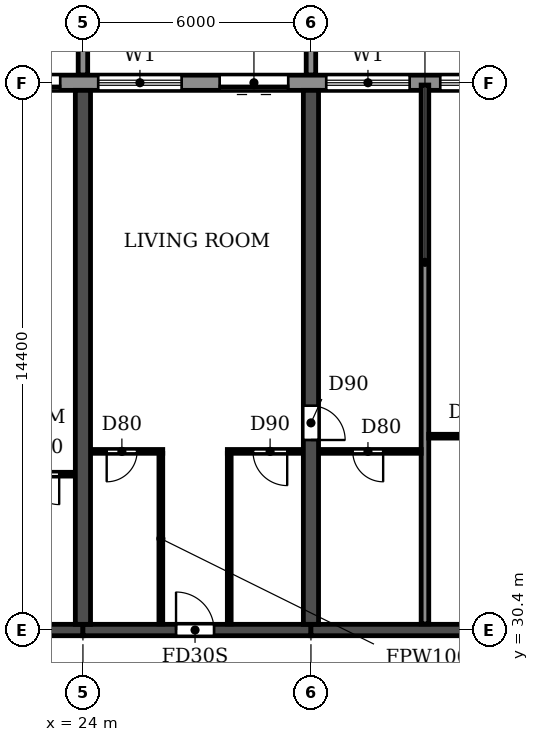
"""IFC4 building model, lengths in metres.
Left out: names, types, materials, properties, quantities, classifications, styles, units other than length and angle.
Written with IfcOpenShell. Run it as: python <this file> out.ifc"""

import sys

from ifc_helpers import new_model, si_unit, direction, frame, frame_2d, origin, place, context, subcontext, project, spatial, polyline, rectangle, outline, extrude, source, transform, mapped, element, fill, save


model = new_model("IFC4")
c1 = context("Model", 3, precision=1e-05, world=origin(), true_north=direction((0.0, 1.0)))
c2 = subcontext(c1, "Body", "Model", "MODEL_VIEW")
j1 = project(units=[si_unit("LENGTHUNIT", "METRE"), si_unit("PLANEANGLEUNIT", "RADIAN")], contexts=[c1])
p1 = place(None, origin())
s1 = spatial("IfcSite", under=j1, at=p1, CompositionType="ELEMENT")
p2 = place(p1, origin())
s2 = spatial("IfcBuilding", under=s1, at=p2, CompositionType="ELEMENT")
p3 = place(p2, frame((0.0, 0.0, 56.4)))
s3 = spatial("IfcBuildingStorey", under=s2, at=p3, CompositionType="ELEMENT", Elevation=56.4)
p4 = place(p3, frame((24.0, 30.55, 0.0), z_axis=(0.0, 0.0, 1.0), x_axis=(0.0, 1.0, 0.0)))
e1 = element("IfcWall", 1, at=p4, inside=s3, PredefinedType="SHEAR", context=c2, shape_type="SweptSolid", body=[
    extrude(rectangle(XDim=14.05, YDim=0.4, at=frame_2d((7.025, 0.0))), origin(), (0.0, 0.0, 1.0), 3.05),
])
p5 = place(p3, frame((30.0, 30.55, 0.0), z_axis=(0.0, 0.0, 1.0), x_axis=(0.0, 1.0, 0.0)))
e2 = element("IfcWall", 2, at=p5, inside=s3, PredefinedType="SHEAR", context=c2, shape_type="SweptSolid", body=[
    extrude(rectangle(XDim=14.05, YDim=0.4, at=frame_2d((7.025, 0.0))), origin(), (0.0, 0.0, 1.0), 3.05),
])
p6 = place(p5, frame((4.85, 0.0, 0.0)))
e3 = element("IfcOpeningElement", 3, at=p6, cuts=e2, PredefinedType="OPENING", context=c2, shape_type="SweptSolid", body=[
    extrude(rectangle(XDim=0.9, YDim=2.1, at=frame_2d((0.45, 1.05))), frame((0.0, 0.21, 0.0), z_axis=(0.0, -1.0, 0.0), x_axis=(1.0, 0.0, 0.0)), (0.0, 0.0, 1.0), 0.42),
])
p7 = place(p3, frame((18.0, 30.4, 0.0), z_axis=(0.0, 0.0, 1.0), x_axis=(1.0, 0.0, 0.0)))
e4 = element("IfcWall", 4, at=p7, inside=s3, PredefinedType="SHEAR", context=c2, shape_type="SweptSolid", body=[
    extrude(rectangle(XDim=6.0, YDim=0.3, at=frame_2d((3.0, 0.0))), origin(), (0.0, 0.0, 1.0), 2.45),
])
p8 = place(p7, frame((2.55, 0.0, 0.0)))
e5 = element("IfcOpeningElement", 5, at=p8, cuts=e4, PredefinedType="OPENING", context=c2, shape_type="SweptSolid", body=[
    extrude(rectangle(XDim=1.0, YDim=2.1, at=frame_2d((0.5, 1.05))), frame((0.0, 0.16, 0.0), z_axis=(0.0, -1.0, 0.0), x_axis=(1.0, 0.0, 0.0)), (0.0, 0.0, 1.0), 0.32),
])
p9 = place(p3, frame((24.0, 30.4, 0.0), z_axis=(0.0, 0.0, 1.0), x_axis=(1.0, 0.0, 0.0)))
e6 = element("IfcWall", 6, at=p9, inside=s3, PredefinedType="SHEAR", context=c2, shape_type="SweptSolid", body=[
    extrude(rectangle(XDim=6.0, YDim=0.3, at=frame_2d((3.0, 0.0))), origin(), (0.0, 0.0, 1.0), 2.45),
])
p10 = place(p9, frame((2.45, 0.0, 0.0)))
e7 = element("IfcOpeningElement", 7, at=p10, cuts=e6, PredefinedType="OPENING", context=c2, shape_type="SweptSolid", body=[
    extrude(rectangle(XDim=1.0, YDim=2.1, at=frame_2d((0.5, 1.05))), frame((0.0, 0.16, 0.0), z_axis=(0.0, -1.0, 0.0), x_axis=(1.0, 0.0, 0.0)), (0.0, 0.0, 1.0), 0.32),
])
p11 = place(p3, frame((30.0, 30.4, 0.0), z_axis=(0.0, 0.0, 1.0), x_axis=(1.0, 0.0, 0.0)))
e8 = element("IfcWall", 8, at=p11, inside=s3, PredefinedType="SHEAR", context=c2, shape_type="SweptSolid", body=[
    extrude(rectangle(XDim=6.0, YDim=0.3, at=frame_2d((3.0, 0.0))), origin(), (0.0, 0.0, 1.0), 2.45),
])
p12 = place(p3, frame((91.317, 44.8, 0.0), z_axis=(0.0, 0.0, 1.0), x_axis=(-1.0, 0.0, 0.0)))
e9 = element("IfcWall", 9, at=p12, inside=s3, PredefinedType="STANDARD", context=c2, shape_type="SweptSolid", body=[
    extrude(rectangle(XDim=80.634, YDim=0.4, at=frame_2d((40.317, 0.0))), origin(), (0.0, 0.0, 1.0), 3.05),
])
p13 = place(p12, frame((76.717, 0.0, 0.9)))
e10 = element("IfcOpeningElement", 10, at=p13, cuts=e9, PredefinedType="OPENING", context=c2, shape_type="SweptSolid", body=[
    extrude(rectangle(XDim=2.2, YDim=1.5, at=frame_2d((1.1, 0.75))), frame((0.0, 0.21, 0.0), z_axis=(0.0, -1.0, 0.0), x_axis=(1.0, 0.0, 0.0)), (0.0, 0.0, 1.0), 0.42),
])
p14 = place(p12, frame((73.917, 0.0, 0.0)))
e11 = element("IfcOpeningElement", 11, at=p14, cuts=e9, PredefinedType="OPENING", context=c2, shape_type="SweptSolid", body=[
    extrude(rectangle(XDim=1.8, YDim=2.4, at=frame_2d((0.9, 1.2))), frame((0.0, 0.21, 0.0), z_axis=(0.0, -1.0, 0.0), x_axis=(1.0, 0.0, 0.0)), (0.0, 0.0, 1.0), 0.42),
])
p15 = place(p12, frame((70.717, 0.0, 0.9)))
e12 = element("IfcOpeningElement", 12, at=p15, cuts=e9, PredefinedType="OPENING", context=c2, shape_type="SweptSolid", body=[
    extrude(rectangle(XDim=2.2, YDim=1.5, at=frame_2d((1.1, 0.75))), frame((0.0, 0.21, 0.0), z_axis=(0.0, -1.0, 0.0), x_axis=(1.0, 0.0, 0.0)), (0.0, 0.0, 1.0), 0.42),
])
p16 = place(p12, frame((67.917, 0.0, 0.0)))
e13 = element("IfcOpeningElement", 13, at=p16, cuts=e9, PredefinedType="OPENING", context=c2, shape_type="SweptSolid", body=[
    extrude(rectangle(XDim=1.8, YDim=2.4, at=frame_2d((0.9, 1.2))), frame((0.0, 0.21, 0.0), z_axis=(0.0, -1.0, 0.0), x_axis=(1.0, 0.0, 0.0)), (0.0, 0.0, 1.0), 0.42),
])
p17 = place(p12, frame((64.717, 0.0, 0.9)))
e14 = element("IfcOpeningElement", 14, at=p17, cuts=e9, PredefinedType="OPENING", context=c2, shape_type="SweptSolid", body=[
    extrude(rectangle(XDim=2.2, YDim=1.5, at=frame_2d((1.1, 0.75))), frame((0.0, 0.21, 0.0), z_axis=(0.0, -1.0, 0.0), x_axis=(1.0, 0.0, 0.0)), (0.0, 0.0, 1.0), 0.42),
])
p18 = place(p12, frame((61.917, 0.0, 0.0)))
e15 = element("IfcOpeningElement", 15, at=p18, cuts=e9, PredefinedType="OPENING", context=c2, shape_type="SweptSolid", body=[
    extrude(rectangle(XDim=1.8, YDim=2.4, at=frame_2d((0.9, 1.2))), frame((0.0, 0.21, 0.0), z_axis=(0.0, -1.0, 0.0), x_axis=(1.0, 0.0, 0.0)), (0.0, 0.0, 1.0), 0.42),
])
p19 = place(p12, frame((58.717, 0.0, 0.9)))
e16 = element("IfcOpeningElement", 16, at=p19, cuts=e9, PredefinedType="OPENING", context=c2, shape_type="SweptSolid", body=[
    extrude(rectangle(XDim=2.2, YDim=1.5, at=frame_2d((1.1, 0.75))), frame((0.0, 0.21, 0.0), z_axis=(0.0, -1.0, 0.0), x_axis=(1.0, 0.0, 0.0)), (0.0, 0.0, 1.0), 0.42),
])
p20 = place(p12, frame((55.717, 0.0, 0.9)))
e17 = element("IfcOpeningElement", 17, at=p20, cuts=e9, PredefinedType="OPENING", context=c2, shape_type="SweptSolid", body=[
    extrude(rectangle(XDim=2.2, YDim=1.5, at=frame_2d((1.1, 0.75))), frame((0.0, 0.21, 0.0), z_axis=(0.0, -1.0, 0.0), x_axis=(1.0, 0.0, 0.0)), (0.0, 0.0, 1.0), 0.42),
])
p21 = place(p12, frame((52.917, 0.0, 0.0)))
e18 = element("IfcOpeningElement", 18, at=p21, cuts=e9, PredefinedType="OPENING", context=c2, shape_type="SweptSolid", body=[
    extrude(rectangle(XDim=1.8, YDim=2.4, at=frame_2d((0.9, 1.2))), frame((0.0, 0.21, 0.0), z_axis=(0.0, -1.0, 0.0), x_axis=(1.0, 0.0, 0.0)), (0.0, 0.0, 1.0), 0.42),
])
p22 = place(p12, frame((49.717, 0.0, 0.9)))
e19 = element("IfcOpeningElement", 19, at=p22, cuts=e9, PredefinedType="OPENING", context=c2, shape_type="SweptSolid", body=[
    extrude(rectangle(XDim=2.2, YDim=1.5, at=frame_2d((1.1, 0.75))), frame((0.0, 0.21, 0.0), z_axis=(0.0, -1.0, 0.0), x_axis=(1.0, 0.0, 0.0)), (0.0, 0.0, 1.0), 0.42),
])
p23 = place(p12, frame((46.917, 0.0, 0.0)))
e20 = element("IfcOpeningElement", 20, at=p23, cuts=e9, PredefinedType="OPENING", context=c2, shape_type="SweptSolid", body=[
    extrude(rectangle(XDim=1.8, YDim=2.4, at=frame_2d((0.9, 1.2))), frame((0.0, 0.21, 0.0), z_axis=(0.0, -1.0, 0.0), x_axis=(1.0, 0.0, 0.0)), (0.0, 0.0, 1.0), 0.42),
])
p24 = place(p12, frame((43.717, 0.0, 0.9)))
e21 = element("IfcOpeningElement", 21, at=p24, cuts=e9, PredefinedType="OPENING", context=c2, shape_type="SweptSolid", body=[
    extrude(rectangle(XDim=2.2, YDim=1.5, at=frame_2d((1.1, 0.75))), frame((0.0, 0.21, 0.0), z_axis=(0.0, -1.0, 0.0), x_axis=(1.0, 0.0, 0.0)), (0.0, 0.0, 1.0), 0.42),
])
p25 = place(p12, frame((40.717, 0.0, 0.9)))
e22 = element("IfcOpeningElement", 22, at=p25, cuts=e9, PredefinedType="OPENING", context=c2, shape_type="SweptSolid", body=[
    extrude(rectangle(XDim=2.2, YDim=1.5, at=frame_2d((1.1, 0.75))), frame((0.0, 0.21, 0.0), z_axis=(0.0, -1.0, 0.0), x_axis=(1.0, 0.0, 0.0)), (0.0, 0.0, 1.0), 0.42),
])
p26 = place(p12, frame((37.717, 0.0, 0.9)))
e23 = element("IfcOpeningElement", 23, at=p26, cuts=e9, PredefinedType="OPENING", context=c2, shape_type="SweptSolid", body=[
    extrude(rectangle(XDim=2.2, YDim=1.5, at=frame_2d((1.1, 0.75))), frame((0.0, 0.21, 0.0), z_axis=(0.0, -1.0, 0.0), x_axis=(1.0, 0.0, 0.0)), (0.0, 0.0, 1.0), 0.42),
])
p27 = place(p12, frame((34.717, 0.0, 0.9)))
e24 = element("IfcOpeningElement", 24, at=p27, cuts=e9, PredefinedType="OPENING", context=c2, shape_type="SweptSolid", body=[
    extrude(rectangle(XDim=2.2, YDim=1.5, at=frame_2d((1.1, 0.75))), frame((0.0, 0.21, 0.0), z_axis=(0.0, -1.0, 0.0), x_axis=(1.0, 0.0, 0.0)), (0.0, 0.0, 1.0), 0.42),
])
p28 = place(p12, frame((31.917, 0.0, 0.0)))
e25 = element("IfcOpeningElement", 25, at=p28, cuts=e9, PredefinedType="OPENING", context=c2, shape_type="SweptSolid", body=[
    extrude(rectangle(XDim=1.8, YDim=2.4, at=frame_2d((0.9, 1.2))), frame((0.0, 0.21, 0.0), z_axis=(0.0, -1.0, 0.0), x_axis=(1.0, 0.0, 0.0)), (0.0, 0.0, 1.0), 0.42),
])
p29 = place(p12, frame((28.917, 0.0, 0.0)))
e26 = element("IfcOpeningElement", 26, at=p29, cuts=e9, PredefinedType="OPENING", context=c2, shape_type="SweptSolid", body=[
    extrude(rectangle(XDim=1.8, YDim=2.4, at=frame_2d((0.9, 1.2))), frame((0.0, 0.21, 0.0), z_axis=(0.0, -1.0, 0.0), x_axis=(1.0, 0.0, 0.0)), (0.0, 0.0, 1.0), 0.42),
])
p30 = place(p12, frame((25.717, 0.0, 0.9)))
e27 = element("IfcOpeningElement", 27, at=p30, cuts=e9, PredefinedType="OPENING", context=c2, shape_type="SweptSolid", body=[
    extrude(rectangle(XDim=2.2, YDim=1.5, at=frame_2d((1.1, 0.75))), frame((0.0, 0.21, 0.0), z_axis=(0.0, -1.0, 0.0), x_axis=(1.0, 0.0, 0.0)), (0.0, 0.0, 1.0), 0.42),
])
p31 = place(p12, frame((22.917, 0.0, 0.0)))
e28 = element("IfcOpeningElement", 28, at=p31, cuts=e9, PredefinedType="OPENING", context=c2, shape_type="SweptSolid", body=[
    extrude(rectangle(XDim=1.8, YDim=2.4, at=frame_2d((0.9, 1.2))), frame((0.0, 0.21, 0.0), z_axis=(0.0, -1.0, 0.0), x_axis=(1.0, 0.0, 0.0)), (0.0, 0.0, 1.0), 0.42),
])
p32 = place(p12, frame((19.717, 0.0, 0.9)))
e29 = element("IfcOpeningElement", 29, at=p32, cuts=e9, PredefinedType="OPENING", context=c2, shape_type="SweptSolid", body=[
    extrude(rectangle(XDim=2.2, YDim=1.5, at=frame_2d((1.1, 0.75))), frame((0.0, 0.21, 0.0), z_axis=(0.0, -1.0, 0.0), x_axis=(1.0, 0.0, 0.0)), (0.0, 0.0, 1.0), 0.42),
])
p33 = place(p12, frame((16.917, 0.0, 0.0)))
e30 = element("IfcOpeningElement", 30, at=p33, cuts=e9, PredefinedType="OPENING", context=c2, shape_type="SweptSolid", body=[
    extrude(rectangle(XDim=1.8, YDim=2.4, at=frame_2d((0.9, 1.2))), frame((0.0, 0.21, 0.0), z_axis=(0.0, -1.0, 0.0), x_axis=(1.0, 0.0, 0.0)), (0.0, 0.0, 1.0), 0.42),
])
p34 = place(p12, frame((13.717, 0.0, 0.9)))
e31 = element("IfcOpeningElement", 31, at=p34, cuts=e9, PredefinedType="OPENING", context=c2, shape_type="SweptSolid", body=[
    extrude(rectangle(XDim=2.2, YDim=1.5, at=frame_2d((1.1, 0.75))), frame((0.0, 0.21, 0.0), z_axis=(0.0, -1.0, 0.0), x_axis=(1.0, 0.0, 0.0)), (0.0, 0.0, 1.0), 0.42),
])
p35 = place(p12, frame((10.917, 0.0, 0.0)))
e32 = element("IfcOpeningElement", 32, at=p35, cuts=e9, PredefinedType="OPENING", context=c2, shape_type="SweptSolid", body=[
    extrude(rectangle(XDim=1.8, YDim=2.4, at=frame_2d((0.9, 1.2))), frame((0.0, 0.21, 0.0), z_axis=(0.0, -1.0, 0.0), x_axis=(1.0, 0.0, 0.0)), (0.0, 0.0, 1.0), 0.42),
])
p36 = place(p12, frame((7.717, 0.0, 0.9)))
e33 = element("IfcOpeningElement", 33, at=p36, cuts=e9, PredefinedType="OPENING", context=c2, shape_type="SweptSolid", body=[
    extrude(rectangle(XDim=2.2, YDim=1.5, at=frame_2d((1.1, 0.75))), frame((0.0, 0.21, 0.0), z_axis=(0.0, -1.0, 0.0), x_axis=(1.0, 0.0, 0.0)), (0.0, 0.0, 1.0), 0.42),
])
p37 = place(p12, frame((4.717, 0.0, 0.9)))
e34 = element("IfcOpeningElement", 34, at=p37, cuts=e9, PredefinedType="OPENING", context=c2, shape_type="SweptSolid", body=[
    extrude(rectangle(XDim=2.2, YDim=1.5, at=frame_2d((1.1, 0.75))), frame((0.0, 0.21, 0.0), z_axis=(0.0, -1.0, 0.0), x_axis=(1.0, 0.0, 0.0)), (0.0, 0.0, 1.0), 0.42),
])
p38 = place(p12, frame((1.717, 0.0, 0.9)))
e35 = element("IfcOpeningElement", 35, at=p38, cuts=e9, PredefinedType="OPENING", context=c2, shape_type="SweptSolid", body=[
    extrude(rectangle(XDim=2.2, YDim=1.5, at=frame_2d((1.1, 0.75))), frame((0.0, 0.21, 0.0), z_axis=(0.0, -1.0, 0.0), x_axis=(1.0, 0.0, 0.0)), (0.0, 0.0, 1.0), 0.42),
])
m1 = source(origin(), c2, "Body", "SweptSolid", [
    extrude(outline(polyline([(0.0, 0.0), (0.25, 0.0), (0.25, 3.1), (0.0, 3.1), (0.0, 0.0)])), origin(), (0.0, 0.0, 1.0), 3.1),
])
for number, where in (
    (36, (23.875, 45.0, 0.0)),
    (37, (29.875, 45.0, 0.0)),
):
    element("IfcWall", number, at=place(p3, frame(where)), inside=s3, PredefinedType="STANDARD", context=c2, shape_type="MappedRepresentation", body=[
        mapped(m1, transform((0.0, 0.0, 0.0))),
    ])
p39 = place(p3, frame((33.0, 30.56, 0.0), z_axis=(0.0, 0.0, 1.0), x_axis=(0.0, 1.0, 0.0)))
e38 = element("IfcWall", 38, at=p39, inside=s3, PredefinedType="PARTITIONING", context=c2, shape_type="SweptSolid", body=[
    extrude(rectangle(XDim=14.18, YDim=0.2, at=frame_2d((7.09, 0.0))), origin(), (0.0, 0.0, 1.0), 3.05),
])
p40 = place(p3, frame((21.9, 34.5, 0.0), z_axis=(0.0, 0.0, 1.0), x_axis=(1.0, 0.0, 0.0)))
e39 = element("IfcWall", 39, at=p40, inside=s3, PredefinedType="PARTITIONING", context=c2, shape_type="SweptSolid", body=[
    extrude(rectangle(XDim=1.89, YDim=0.1, at=frame_2d((0.945, 0.0))), origin(), (0.0, 0.0, 1.0), 3.05),
])
p41 = place(p40, frame((0.675, 0.0, 0.0)))
e40 = element("IfcOpeningElement", 40, at=p41, cuts=e39, PredefinedType="OPENING", context=c2, shape_type="SweptSolid", body=[
    extrude(rectangle(XDim=0.8, YDim=2.1, at=frame_2d((0.4, 1.05))), frame((0.0, 0.06, 0.0), z_axis=(0.0, -1.0, 0.0), x_axis=(1.0, 0.0, 0.0)), (0.0, 0.0, 1.0), 0.12),
])
p42 = place(p3, frame((24.21, 35.1, 0.0), z_axis=(0.0, 0.0, 1.0), x_axis=(1.0, 0.0, 0.0)))
e41 = element("IfcWall", 41, at=p42, inside=s3, PredefinedType="PARTITIONING", context=c2, shape_type="SweptSolid", body=[
    extrude(rectangle(XDim=1.89, YDim=0.1, at=frame_2d((0.945, 0.0))), origin(), (0.0, 0.0, 1.0), 3.05),
])
p43 = place(p42, frame((0.415, 0.0, 0.0)))
e42 = element("IfcOpeningElement", 42, at=p43, cuts=e41, PredefinedType="OPENING", context=c2, shape_type="SweptSolid", body=[
    extrude(rectangle(XDim=0.8, YDim=2.1, at=frame_2d((0.4, 1.05))), frame((0.0, 0.06, 0.0), z_axis=(0.0, -1.0, 0.0), x_axis=(1.0, 0.0, 0.0)), (0.0, 0.0, 1.0), 0.12),
])
p44 = place(p3, frame((27.8, 35.1, 0.0), z_axis=(0.0, 0.0, 1.0), x_axis=(1.0, 0.0, 0.0)))
e43 = element("IfcWall", 43, at=p44, inside=s3, PredefinedType="PARTITIONING", context=c2, shape_type="SweptSolid", body=[
    extrude(rectangle(XDim=1.99, YDim=0.1, at=frame_2d((0.995, 0.0))), origin(), (0.0, 0.0, 1.0), 3.05),
])
p45 = place(p44, frame((0.675, 0.0, 0.0)))
e44 = element("IfcOpeningElement", 44, at=p45, cuts=e43, PredefinedType="OPENING", context=c2, shape_type="SweptSolid", body=[
    extrude(rectangle(XDim=0.9, YDim=2.1, at=frame_2d((0.45, 1.05))), frame((0.0, 0.06, 0.0), z_axis=(0.0, -1.0, 0.0), x_axis=(1.0, 0.0, 0.0)), (0.0, 0.0, 1.0), 0.12),
])
p46 = place(p3, frame((30.21, 35.1, 0.0), z_axis=(0.0, 0.0, 1.0), x_axis=(1.0, 0.0, 0.0)))
e45 = element("IfcWall", 45, at=p46, inside=s3, PredefinedType="PARTITIONING", context=c2, shape_type="SweptSolid", body=[
    extrude(rectangle(XDim=2.69, YDim=0.1, at=frame_2d((1.345, 0.0))), origin(), (0.0, 0.0, 1.0), 3.05),
])
p47 = place(p46, frame((0.89, 0.0, 0.0)))
e46 = element("IfcOpeningElement", 46, at=p47, cuts=e45, PredefinedType="OPENING", context=c2, shape_type="SweptSolid", body=[
    extrude(rectangle(XDim=0.8, YDim=2.1, at=frame_2d((0.4, 1.05))), frame((0.0, 0.06, 0.0), z_axis=(0.0, -1.0, 0.0), x_axis=(1.0, 0.0, 0.0)), (0.0, 0.0, 1.0), 0.12),
])
p48 = place(p3, frame((33.1, 35.5, 0.0), z_axis=(0.0, 0.0, 1.0), x_axis=(1.0, 0.0, 0.0)))
e47 = element("IfcWall", 47, at=p48, inside=s3, PredefinedType="PARTITIONING", context=c2, shape_type="SweptSolid", body=[
    extrude(rectangle(XDim=2.69, YDim=0.1, at=frame_2d((1.345, 0.0))), origin(), (0.0, 0.0, 1.0), 3.05),
])
p49 = place(p48, frame((1.0, 0.0, 0.0)))
e48 = element("IfcOpeningElement", 48, at=p49, cuts=e47, PredefinedType="OPENING", context=c2, shape_type="SweptSolid", body=[
    extrude(rectangle(XDim=0.8, YDim=2.1, at=frame_2d((0.4, 1.05))), frame((0.0, 0.06, 0.0), z_axis=(0.0, -1.0, 0.0), x_axis=(1.0, 0.0, 0.0)), (0.0, 0.0, 1.0), 0.12),
])
for number, where, z_axis, x_axis in (
    (49, (26.05, 30.56, 0.0), (0.0, 0.0, 1.0), (0.0, 1.0, 0.0)),
    (50, (27.85, 30.56, 0.0), (0.0, 0.0, 1.0), (0.0, 1.0, 0.0)),
):
    element("IfcWall", number, at=place(p3, frame(where, z_axis=z_axis, x_axis=x_axis)), inside=s3, PredefinedType="PARTITIONING", context=c2, shape_type="SweptSolid", body=[
        extrude(rectangle(XDim=4.49, YDim=0.1, at=frame_2d((2.245, 0.0))), origin(), (0.0, 0.0, 1.0), 3.05),
    ])
p50 = place(p16, origin())
e51 = element("IfcDoor", 51, at=p50, inside=s3, OperationType="DOUBLE_DOOR_SLIDING", PredefinedType="DOOR", context=c2, shape_type="SweptSolid", body=[
    extrude(rectangle(XDim=1.8, YDim=2.4, at=frame_2d((0.9, 1.2))), frame((0.0, 0.025, 0.0), z_axis=(0.0, -1.0, 0.0), x_axis=(1.0, 0.0, 0.0)), (0.0, 0.0, 1.0), 0.05),
])
fill(e13, e51)
p51 = place(p17, origin())
e52 = element("IfcWindow", 52, at=p51, inside=s3, PartitioningType="DOUBLE_PANEL_HORIZONTAL", PredefinedType="WINDOW", context=c2, shape_type="SweptSolid", body=[
    extrude(rectangle(XDim=2.2, YDim=1.5, at=frame_2d((1.1, 0.75))), frame((0.0, 0.03, 0.0), z_axis=(0.0, -1.0, 0.0), x_axis=(1.0, 0.0, 0.0)), (0.0, 0.0, 1.0), 0.06),
])
fill(e14, e52)
p52 = place(p18, origin())
e53 = element("IfcDoor", 53, at=p52, inside=s3, OperationType="DOUBLE_DOOR_SLIDING", PredefinedType="DOOR", context=c2, shape_type="SweptSolid", body=[
    extrude(rectangle(XDim=1.8, YDim=2.4, at=frame_2d((0.9, 1.2))), frame((0.0, 0.025, 0.0), z_axis=(0.0, -1.0, 0.0), x_axis=(1.0, 0.0, 0.0)), (0.0, 0.0, 1.0), 0.05),
])
fill(e15, e53)
p53 = place(p19, origin())
e54 = element("IfcWindow", 54, at=p53, inside=s3, PartitioningType="DOUBLE_PANEL_HORIZONTAL", PredefinedType="WINDOW", context=c2, shape_type="SweptSolid", body=[
    extrude(rectangle(XDim=2.2, YDim=1.5, at=frame_2d((1.1, 0.75))), frame((0.0, 0.03, 0.0), z_axis=(0.0, -1.0, 0.0), x_axis=(1.0, 0.0, 0.0)), (0.0, 0.0, 1.0), 0.06),
])
fill(e16, e54)
p54 = place(p20, origin())
e55 = element("IfcWindow", 55, at=p54, inside=s3, PartitioningType="DOUBLE_PANEL_HORIZONTAL", PredefinedType="WINDOW", context=c2, shape_type="SweptSolid", body=[
    extrude(rectangle(XDim=2.2, YDim=1.5, at=frame_2d((1.1, 0.75))), frame((0.0, 0.03, 0.0), z_axis=(0.0, -1.0, 0.0), x_axis=(1.0, 0.0, 0.0)), (0.0, 0.0, 1.0), 0.06),
])
fill(e17, e55)
p55 = place(p41, frame((0.8, 0.0, 0.0), z_axis=(0.0, 0.0, 1.0), x_axis=(-1.0, 0.0, 0.0)))
e56 = element("IfcDoor", 56, at=p55, inside=s3, OperationType="SINGLE_SWING_LEFT", PredefinedType="DOOR", context=c2, shape_type="SweptSolid", body=[
    extrude(rectangle(XDim=0.8, YDim=2.1, at=frame_2d((0.4, 1.05))), frame((0.0, 0.025, 0.0), z_axis=(0.0, -1.0, 0.0), x_axis=(1.0, 0.0, 0.0)), (0.0, 0.0, 1.0), 0.05),
])
fill(e40, e56)
p56 = place(p47, frame((0.8, 0.0, 0.0), z_axis=(0.0, 0.0, 1.0), x_axis=(-1.0, 0.0, 0.0)))
e57 = element("IfcDoor", 57, at=p56, inside=s3, OperationType="SINGLE_SWING_LEFT", PredefinedType="DOOR", context=c2, shape_type="SweptSolid", body=[
    extrude(rectangle(XDim=0.8, YDim=2.1, at=frame_2d((0.4, 1.05))), frame((0.0, 0.025, 0.0), z_axis=(0.0, -1.0, 0.0), x_axis=(1.0, 0.0, 0.0)), (0.0, 0.0, 1.0), 0.05),
])
fill(e46, e57)
p57 = place(p43, frame((0.8, 0.0, 0.0), z_axis=(0.0, 0.0, 1.0), x_axis=(-1.0, 0.0, 0.0)))
e58 = element("IfcDoor", 58, at=p57, inside=s3, OperationType="SINGLE_SWING_RIGHT", PredefinedType="DOOR", context=c2, shape_type="SweptSolid", body=[
    extrude(rectangle(XDim=0.8, YDim=2.1, at=frame_2d((0.4, 1.05))), frame((0.0, 0.025, 0.0), z_axis=(0.0, -1.0, 0.0), x_axis=(1.0, 0.0, 0.0)), (0.0, 0.0, 1.0), 0.05),
])
fill(e42, e58)
p58 = place(p10, origin())
e59 = element("IfcDoor", 59, at=p58, inside=s3, OperationType="SINGLE_SWING_LEFT", PredefinedType="DOOR", context=c2, shape_type="SweptSolid", body=[
    extrude(rectangle(XDim=1.0, YDim=2.1, at=frame_2d((0.5, 1.05))), frame((0.0, 0.025, 0.0), z_axis=(0.0, -1.0, 0.0), x_axis=(1.0, 0.0, 0.0)), (0.0, 0.0, 1.0), 0.05),
])
fill(e7, e59)
p59 = place(p45, frame((0.9, 0.0, 0.0), z_axis=(0.0, 0.0, 1.0), x_axis=(-1.0, 0.0, 0.0)))
e60 = element("IfcDoor", 60, at=p59, inside=s3, OperationType="SINGLE_SWING_LEFT", PredefinedType="DOOR", context=c2, shape_type="SweptSolid", body=[
    extrude(rectangle(XDim=0.9, YDim=2.1, at=frame_2d((0.45, 1.05))), frame((0.0, 0.025, 0.0), z_axis=(0.0, -1.0, 0.0), x_axis=(1.0, 0.0, 0.0)), (0.0, 0.0, 1.0), 0.05),
])
fill(e44, e60)
p60 = place(p6, frame((0.9, 0.0, 0.0), z_axis=(0.0, 0.0, 1.0), x_axis=(-1.0, 0.0, 0.0)))
e61 = element("IfcDoor", 61, at=p60, inside=s3, OperationType="SINGLE_SWING_RIGHT", PredefinedType="DOOR", context=c2, shape_type="SweptSolid", body=[
    extrude(rectangle(XDim=0.9, YDim=2.1, at=frame_2d((0.45, 1.05))), frame((0.0, 0.025, 0.0), z_axis=(0.0, -1.0, 0.0), x_axis=(1.0, 0.0, 0.0)), (0.0, 0.0, 1.0), 0.05),
])
fill(e3, e61)
save(model, sys.argv[1])
